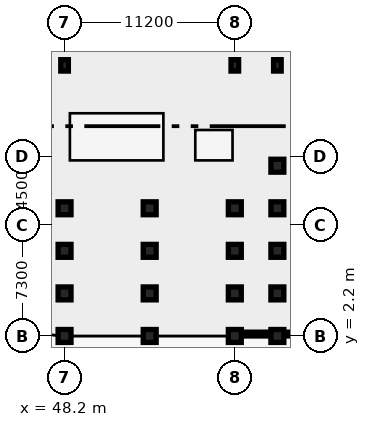
"""IFC4 building model, lengths in metres.
Left out: names, types, materials, properties, quantities, classifications, styles, units other than length and angle.
Written with IfcOpenShell. Run it as: python <this file> out.ifc"""

import sys

from ifc_helpers import new_model, si_unit, direction, frame, frame_2d, origin, origin_2d, place, context, subcontext, project, spatial, rectangle, extrude, element, fill, save


model = new_model("IFC4")
c1 = context("Model", 3, precision=1e-05, world=origin(), true_north=direction((0.0, 1.0)))
c2 = subcontext(c1, "Body", "Model", "MODEL_VIEW")
j1 = project(units=[si_unit("LENGTHUNIT", "METRE"), si_unit("PLANEANGLEUNIT", "RADIAN")], contexts=[c1])
p1 = place(None, origin())
s1 = spatial("IfcSite", under=j1, at=p1, CompositionType="ELEMENT")
p2 = place(p1, origin())
s2 = spatial("IfcBuilding", under=s1, at=p2, CompositionType="ELEMENT")
p3 = place(p2, origin())
s3 = spatial("IfcBuildingStorey", under=s2, at=p3, CompositionType="ELEMENT", Elevation=0.0)
p4 = place(p3, frame((48.08, 13.575, 0.0), z_axis=(0.0, 0.0, 1.0), x_axis=(1.0, 0.0, 0.0)))
e1 = element("IfcWall", 1, at=p4, inside=s3, PredefinedType="SHEAR", context=c2, shape_type="SweptSolid", body=[
    extrude(rectangle(XDim=8.545, YDim=0.35, at=frame_2d((4.272, 0.0))), origin(), (0.0, 0.0, 1.0), 4.15),
])
p5 = place(p3, frame((48.55, 17.025, 0.0), z_axis=(0.0, 0.0, 1.0), x_axis=(1.0, 0.0, 0.0)))
e2 = element("IfcWall", 2, at=p5, inside=s3, PredefinedType="SHEAR", context=c2, shape_type="SweptSolid", body=[
    extrude(rectangle(XDim=8.075, YDim=0.35, at=frame_2d((4.038, 0.0))), origin(), (0.0, 0.0, 1.0), 4.15),
])
p6 = place(p5, frame((6.38, 0.0, 0.0)))
e3 = element("IfcOpeningElement", 3, at=p6, cuts=e2, PredefinedType="OPENING", context=c2, shape_type="SweptSolid", body=[
    extrude(rectangle(XDim=1.24, YDim=2.15, at=frame_2d((0.62, 1.075))), frame((0.0, 0.185, 0.0), z_axis=(0.0, -1.0, 0.0), x_axis=(1.0, 0.0, 0.0)), (0.0, 0.0, 1.0), 0.37),
])
p7 = place(p3, frame((48.375, 17.35, 0.0), z_axis=(0.0, 0.0, 1.0), x_axis=(0.0, -1.0, 0.0)))
e4 = element("IfcWall", 4, at=p7, inside=s3, PredefinedType="SHEAR", context=c2, shape_type="SweptSolid", body=[
    extrude(rectangle(XDim=3.6, YDim=0.35, at=frame_2d((1.8, 0.0))), origin(), (0.0, 0.0, 1.0), 4.15),
])
p8 = place(p3, frame((56.65, 13.525, 0.0), z_axis=(0.0, 0.0, 1.0), x_axis=(1.0, 0.0, 0.0)))
e5 = element("IfcWall", 5, at=p8, inside=s3, PredefinedType="SHEAR", context=c2, shape_type="SweptSolid", body=[
    extrude(rectangle(XDim=2.8, YDim=0.25, at=frame_2d((1.4, 0.0))), origin(), (0.0, 0.0, 1.0), 4.15),
])
p9 = place(p3, frame((59.275, 15.85, 0.0), z_axis=(0.0, 0.0, 1.0), x_axis=(0.0, -1.0, 0.0)))
e6 = element("IfcWall", 6, at=p9, inside=s3, PredefinedType="SHEAR", context=c2, shape_type="SweptSolid", body=[
    extrude(rectangle(XDim=2.15, YDim=0.25, at=frame_2d((1.075, 0.0))), origin(), (0.0, 0.0, 1.0), 4.15),
])
p10 = place(p3, frame((48.2, 20.0, 0.0), z_axis=(0.0, 0.0, 1.0), x_axis=(1.0, 0.0, 0.0)))
e7 = element("IfcColumn", 7, at=p10, inside=s3, PredefinedType="COLUMN", context=c2, shape_type="SweptSolid", body=[
    extrude(rectangle(XDim=0.5, YDim=0.75, at=origin_2d()), origin(), (0.0, 0.0, 1.0), 4.15),
])
for number, where, z_axis, x_axis in (
    (8, (48.2, 10.6, 0.0), (0.0, 0.0, 1.0), (1.0, 0.0, 0.0)),
    (9, (48.2, 7.8, 0.0), (0.0, 0.0, 1.0), (1.0, 0.0, 0.0)),
    (10, (48.2, 5.0, 0.0), (0.0, 0.0, 1.0), (1.0, 0.0, 0.0)),
    (11, (48.2, 2.2, 0.0), (0.0, 0.0, 1.0), (1.0, 0.0, 0.0)),
    (12, (53.8, 10.6, 0.0), (0.0, 0.0, 1.0), (1.0, 0.0, 0.0)),
    (13, (53.8, 7.8, 0.0), (0.0, 0.0, 1.0), (1.0, 0.0, 0.0)),
    (14, (53.8, 5.0, 0.0), (0.0, 0.0, 1.0), (1.0, 0.0, 0.0)),
    (15, (53.8, 2.2, 0.0), (0.0, 0.0, 1.0), (1.0, 0.0, 0.0)),
):
    element("IfcColumn", number, at=place(p3, frame(where, z_axis=z_axis, x_axis=x_axis)), inside=s3, PredefinedType="COLUMN", context=c2, shape_type="SweptSolid", body=[
        extrude(rectangle(XDim=0.85, YDim=0.85, at=origin_2d()), origin(), (0.0, 0.0, 1.0), 4.15),
    ])
p11 = place(p3, frame((59.4, 20.0, 0.0), z_axis=(0.0, 0.0, 1.0), x_axis=(1.0, 0.0, 0.0)))
e16 = element("IfcColumn", 16, at=p11, inside=s3, PredefinedType="COLUMN", context=c2, shape_type="SweptSolid", body=[
    extrude(rectangle(XDim=0.5, YDim=0.75, at=origin_2d()), origin(), (0.0, 0.0, 1.0), 4.15),
])
for number, where, z_axis, x_axis in (
    (17, (59.4, 10.6, 0.0), (0.0, 0.0, 1.0), (1.0, 0.0, 0.0)),
    (18, (59.4, 7.8, 0.0), (0.0, 0.0, 1.0), (1.0, 0.0, 0.0)),
    (19, (59.4, 5.0, 0.0), (0.0, 0.0, 1.0), (1.0, 0.0, 0.0)),
    (20, (59.4, 2.2, 0.0), (0.0, 0.0, 1.0), (1.0, 0.0, 0.0)),
):
    element("IfcColumn", number, at=place(p3, frame(where, z_axis=z_axis, x_axis=x_axis)), inside=s3, PredefinedType="COLUMN", context=c2, shape_type="SweptSolid", body=[
        extrude(rectangle(XDim=0.85, YDim=0.85, at=origin_2d()), origin(), (0.0, 0.0, 1.0), 4.15),
    ])
p12 = place(p3, frame((62.2, 20.0, 0.0), z_axis=(0.0, 0.0, 1.0), x_axis=(1.0, 0.0, 0.0)))
e21 = element("IfcColumn", 21, at=p12, inside=s3, PredefinedType="COLUMN", context=c2, shape_type="SweptSolid", body=[
    extrude(rectangle(XDim=0.5, YDim=0.75, at=origin_2d()), origin(), (0.0, 0.0, 1.0), 4.15),
])
for number, where, z_axis, x_axis in (
    (22, (62.2, 13.4, 0.0), (0.0, 0.0, 1.0), (1.0, 0.0, 0.0)),
    (23, (62.2, 10.6, 0.0), (0.0, 0.0, 1.0), (1.0, 0.0, 0.0)),
    (24, (62.2, 7.8, 0.0), (0.0, 0.0, 1.0), (1.0, 0.0, 0.0)),
    (25, (62.2, 5.0, 0.0), (0.0, 0.0, 1.0), (1.0, 0.0, 0.0)),
    (26, (62.2, 2.2, 0.0), (0.0, 0.0, 1.0), (1.0, 0.0, 0.0)),
):
    element("IfcColumn", number, at=place(p3, frame(where, z_axis=z_axis, x_axis=x_axis)), inside=s3, PredefinedType="COLUMN", context=c2, shape_type="SweptSolid", body=[
        extrude(rectangle(XDim=0.85, YDim=0.85, at=origin_2d()), origin(), (0.0, 0.0, 1.0), 4.15),
    ])
p13 = place(p3, frame((53.7, 19.98, 0.0), z_axis=(0.0, 0.0, 1.0), x_axis=(1.0, 0.0, 0.0)))
e27 = element("IfcWall", 27, at=p13, inside=s3, PredefinedType="STANDARD", context=c2, shape_type="SweptSolid", body=[
    extrude(rectangle(XDim=5.65, YDim=0.2, at=frame_2d((2.825, 0.0))), origin(), (0.0, 0.0, 1.0), 3.492),
])
p14 = place(p13, frame((1.923, 0.0, 0.0)))
e28 = element("IfcOpeningElement", 28, at=p14, cuts=e27, PredefinedType="OPENING", context=c2, shape_type="SweptSolid", body=[
    extrude(rectangle(XDim=1.24, YDim=2.15, at=frame_2d((0.62, 1.075))), frame((0.0, 0.11, 0.0), z_axis=(0.0, -1.0, 0.0), x_axis=(1.0, 0.0, 0.0)), (0.0, 0.0, 1.0), 0.22),
])
p15 = place(p3, frame((48.45, 19.98, 0.0), z_axis=(0.0, 0.0, 1.0), x_axis=(1.0, 0.0, 0.0)))
e29 = element("IfcWall", 29, at=p15, inside=s3, PredefinedType="STANDARD", context=c2, shape_type="SweptSolid", body=[
    extrude(rectangle(XDim=5.25, YDim=0.2, at=frame_2d((2.625, 0.0))), origin(), (0.0, 0.0, 1.0), 3.492),
])
p16 = place(p15, frame((2.165, 0.0, 0.0)))
e30 = element("IfcOpeningElement", 30, at=p16, cuts=e29, PredefinedType="OPENING", context=c2, shape_type="SweptSolid", body=[
    extrude(rectangle(XDim=0.92, YDim=2.1, at=frame_2d((0.46, 1.05))), frame((0.0, 0.11, 0.0), z_axis=(0.0, -1.0, 0.0), x_axis=(1.0, 0.0, 0.0)), (0.0, 0.0, 1.0), 0.22),
])
p17 = place(p3, frame((53.7, 19.98, 0.0), z_axis=(0.0, 0.0, 1.0), x_axis=(0.0, -1.0, 0.0)))
e31 = element("IfcWall", 31, at=p17, inside=s3, PredefinedType="STANDARD", context=c2, shape_type="SweptSolid", body=[
    extrude(rectangle(XDim=2.93, YDim=0.2, at=frame_2d((1.465, 0.0))), origin(), (0.0, 0.0, 1.0), 3.492),
])
p18 = place(p3, frame((59.35, 19.98, 0.0), z_axis=(0.0, 0.0, 1.0), x_axis=(0.0, -1.0, 0.0)))
e32 = element("IfcWall", 32, at=p18, inside=s3, PredefinedType="STANDARD", context=c2, shape_type="SweptSolid", body=[
    extrude(rectangle(XDim=4.13, YDim=0.2, at=frame_2d((2.065, 0.0))), origin(), (0.0, 0.0, 1.0), 3.492),
])
p19 = place(p3, frame((56.7, 17.05, 0.0), z_axis=(0.0, 0.0, 1.0), x_axis=(0.0, -1.0, 0.0)))
e33 = element("IfcWall", 33, at=p19, inside=s3, PredefinedType="STANDARD", context=c2, shape_type="SweptSolid", body=[
    extrude(rectangle(XDim=3.3, YDim=0.2, at=frame_2d((1.65, 0.0))), origin(), (0.0, 0.0, 1.0), 4.15),
])
p20 = place(p3, frame((56.7, 15.85, 0.0), z_axis=(0.0, 0.0, 1.0), x_axis=(1.0, 0.0, 0.0)))
e34 = element("IfcWall", 34, at=p20, inside=s3, PredefinedType="STANDARD", context=c2, shape_type="SweptSolid", body=[
    extrude(rectangle(XDim=2.55, YDim=0.2, at=frame_2d((1.275, 0.0))), origin(), (0.0, 0.0, 1.0), 3.492),
])
p21 = place(p20, frame((0.725, 0.0, 0.0)))
e35 = element("IfcOpeningElement", 35, at=p21, cuts=e34, PredefinedType="OPENING", context=c2, shape_type="SweptSolid", body=[
    extrude(rectangle(XDim=1.1, YDim=2.15, at=frame_2d((0.55, 1.075))), frame((0.0, 0.11, 0.0), z_axis=(0.0, -1.0, 0.0), x_axis=(1.0, 0.0, 0.0)), (0.0, 0.0, 1.0), 0.22),
])
p22 = place(p3, frame((53.8, 13.3, 0.0), z_axis=(0.0, 0.0, 1.0), x_axis=(0.0, -1.0, 0.0)))
e36 = element("IfcWall", 36, at=p22, inside=s3, PredefinedType="PARTITIONING", context=c2, shape_type="SweptSolid", body=[
    extrude(rectangle(XDim=10.82, YDim=0.125, at=frame_2d((5.41, 0.0))), origin(), (0.0, 0.0, 1.0), 3.492),
])
p23 = place(p22, frame((0.899, 0.0, 0.0)))
e37 = element("IfcOpeningElement", 37, at=p23, cuts=e36, PredefinedType="OPENING", context=c2, shape_type="SweptSolid", body=[
    extrude(rectangle(XDim=0.8, YDim=2.1, at=frame_2d((0.4, 1.05))), frame((0.0, 0.073, 0.0), z_axis=(0.0, -1.0, 0.0), x_axis=(1.0, 0.0, 0.0)), (0.0, 0.0, 1.0), 0.145),
])
p24 = place(p3, frame((59.4, 20.0, 0.0), z_axis=(0.0, 0.0, 1.0), x_axis=(1.0, 0.0, 0.0)))
e38 = element("IfcWall", 38, at=p24, inside=s3, PredefinedType="STANDARD", context=c2, shape_type="SweptSolid", body=[
    extrude(rectangle(XDim=2.8, YDim=0.2, at=frame_2d((1.4, 0.0))), origin(), (0.0, 0.0, 1.0), 3.492),
])
p25 = place(p24, frame((0.9, 0.0, 0.0)))
e39 = element("IfcOpeningElement", 39, at=p25, cuts=e38, PredefinedType="OPENING", context=c2, shape_type="SweptSolid", body=[
    extrude(rectangle(XDim=1.0, YDim=2.15, at=frame_2d((0.5, 1.075))), frame((0.0, 0.11, 0.0), z_axis=(0.0, -1.0, 0.0), x_axis=(1.0, 0.0, 0.0)), (0.0, 0.0, 1.0), 0.22),
])
p26 = place(p3, frame((59.48, 7.8, 0.0), z_axis=(0.0, 0.0, 1.0), x_axis=(1.0, 0.0, 0.0)))
e40 = element("IfcWall", 40, at=p26, inside=s3, PredefinedType="PLUMBINGWALL", context=c2, shape_type="SweptSolid", body=[
    extrude(rectangle(XDim=2.64, YDim=0.16, at=frame_2d((1.32, 0.0))), origin(), (0.0, 0.0, 1.0), 3.492),
])
p27 = place(p26, frame((0.87, 0.0, 0.0)))
e41 = element("IfcOpeningElement", 41, at=p27, cuts=e40, PredefinedType="OPENING", context=c2, shape_type="SweptSolid", body=[
    extrude(rectangle(XDim=0.9, YDim=2.1, at=frame_2d((0.45, 1.05))), frame((0.0, 0.09, 0.0), z_axis=(0.0, -1.0, 0.0), x_axis=(1.0, 0.0, 0.0)), (0.0, 0.0, 1.0), 0.18),
])
p28 = place(p3, frame((62.2, 20.0, 0.0), z_axis=(0.0, 0.0, 1.0), x_axis=(1.0, 0.0, 0.0)))
e42 = element("IfcWall", 42, at=p28, inside=s3, PredefinedType="STANDARD", context=c2, shape_type="SweptSolid", body=[
    extrude(rectangle(XDim=2.8, YDim=0.2, at=frame_2d((1.4, 0.0))), origin(), (0.0, 0.0, 1.0), 3.492),
])
p29 = place(p3, frame((62.28, 7.8, 0.0), z_axis=(0.0, 0.0, 1.0), x_axis=(1.0, 0.0, 0.0)))
e43 = element("IfcWall", 43, at=p29, inside=s3, PredefinedType="PLUMBINGWALL", context=c2, shape_type="SweptSolid", body=[
    extrude(rectangle(XDim=2.64, YDim=0.16, at=frame_2d((1.32, 0.0))), origin(), (0.0, 0.0, 1.0), 3.492),
])
p30 = place(p29, frame((0.92, 0.0, 0.0)))
e44 = element("IfcOpeningElement", 44, at=p30, cuts=e43, PredefinedType="OPENING", context=c2, shape_type="SweptSolid", body=[
    extrude(rectangle(XDim=0.8, YDim=2.1, at=frame_2d((0.4, 1.05))), frame((0.0, 0.09, 0.0), z_axis=(0.0, -1.0, 0.0), x_axis=(1.0, 0.0, 0.0)), (0.0, 0.0, 1.0), 0.18),
])
p31 = place(p3, frame((59.4, 13.3, 0.0), z_axis=(0.0, 0.0, 1.0), x_axis=(0.0, -1.0, 0.0)))
e45 = element("IfcWall", 45, at=p31, inside=s3, PredefinedType="PARTITIONING", context=c2, shape_type="SweptSolid", body=[
    extrude(rectangle(XDim=10.82, YDim=0.15, at=frame_2d((5.41, 0.0))), origin(), (0.0, 0.0, 1.0), 3.492),
])
p32 = place(p31, frame((0.899, 0.0, 0.0)))
e46 = element("IfcOpeningElement", 46, at=p32, cuts=e45, PredefinedType="OPENING", context=c2, shape_type="SweptSolid", body=[
    extrude(rectangle(XDim=0.8, YDim=2.1, at=frame_2d((0.4, 1.05))), frame((0.0, 0.085, 0.0), z_axis=(0.0, -1.0, 0.0), x_axis=(1.0, 0.0, 0.0)), (0.0, 0.0, 1.0), 0.17),
])
p33 = place(p3, frame((62.2, 19.95, 0.0), z_axis=(0.0, 0.0, 1.0), x_axis=(0.0, -1.0, 0.0)))
e47 = element("IfcWall", 47, at=p33, inside=s3, PredefinedType="PARTITIONING", context=c2, shape_type="SweptSolid", body=[
    extrude(rectangle(XDim=6.53, YDim=0.15, at=frame_2d((3.265, 0.0))), origin(), (0.0, 0.0, 1.0), 3.492),
])
p34 = place(p33, frame((2.815, 0.0, 0.0)))
e48 = element("IfcOpeningElement", 48, at=p34, cuts=e47, PredefinedType="OPENING", context=c2, shape_type="SweptSolid", body=[
    extrude(rectangle(XDim=0.9, YDim=2.1, at=frame_2d((0.45, 1.05))), frame((0.0, 0.085, 0.0), z_axis=(0.0, -1.0, 0.0), x_axis=(1.0, 0.0, 0.0)), (0.0, 0.0, 1.0), 0.17),
])
p35 = place(p3, frame((62.2, 13.3, 0.0), z_axis=(0.0, 0.0, 1.0), x_axis=(0.0, -1.0, 0.0)))
e49 = element("IfcWall", 49, at=p35, inside=s3, PredefinedType="PARTITIONING", context=c2, shape_type="SweptSolid", body=[
    extrude(rectangle(XDim=10.82, YDim=0.15, at=frame_2d((5.41, 0.0))), origin(), (0.0, 0.0, 1.0), 3.492),
])
p36 = place(p35, frame((0.899, 0.0, 0.0)))
e50 = element("IfcOpeningElement", 50, at=p36, cuts=e49, PredefinedType="OPENING", context=c2, shape_type="SweptSolid", body=[
    extrude(rectangle(XDim=0.8, YDim=2.1, at=frame_2d((0.4, 1.05))), frame((0.0, 0.085, 0.0), z_axis=(0.0, -1.0, 0.0), x_axis=(1.0, 0.0, 0.0)), (0.0, 0.0, 1.0), 0.17),
])
p37 = place(p3, frame((48.2, 20.0, 0.0), z_axis=(0.0, 0.0, 1.0), x_axis=(-0.996193663584, 0.087167566415, 0.0)))
e51 = element("IfcWall", 51, at=p37, inside=s3, PredefinedType="STANDARD", context=c2, shape_type="SweptSolid", body=[
    extrude(rectangle(XDim=4.916, YDim=0.2, at=frame_2d((2.458, 0.0))), origin(), (0.0, 0.0, 1.0), 3.492),
])
p38 = place(p37, frame((1.918, 0.0, 0.0)))
e52 = element("IfcOpeningElement", 52, at=p38, cuts=e51, PredefinedType="OPENING", context=c2, shape_type="SweptSolid", body=[
    extrude(rectangle(XDim=1.08, YDim=2.15, at=frame_2d((0.54, 1.075))), frame((0.0, 0.11, 0.0), z_axis=(0.0, -1.0, 0.0), x_axis=(1.0, 0.0, 0.0)), (0.0, 0.0, 1.0), 0.22),
])
p39 = place(p3, frame((48.2, 13.3, 0.0), z_axis=(0.0, 0.0, 1.0), x_axis=(0.0, -1.0, 0.0)))
e53 = element("IfcWall", 53, at=p39, inside=s3, PredefinedType="PARTITIONING", context=c2, shape_type="SweptSolid", body=[
    extrude(rectangle(XDim=10.82, YDim=0.15, at=frame_2d((5.41, 0.0))), origin(), (0.0, 0.0, 1.0), 3.492),
])
p40 = place(p39, frame((0.899, 0.0, 0.0)))
e54 = element("IfcOpeningElement", 54, at=p40, cuts=e53, PredefinedType="OPENING", context=c2, shape_type="SweptSolid", body=[
    extrude(rectangle(XDim=0.8, YDim=2.1, at=frame_2d((0.4, 1.05))), frame((0.0, 0.085, 0.0), z_axis=(0.0, -1.0, 0.0), x_axis=(1.0, 0.0, 0.0)), (0.0, 0.0, 1.0), 0.17),
])
p41 = place(p3, frame((59.829, 2.325, 0.0), z_axis=(0.0, 0.0, 1.0), x_axis=(1.0, 0.0, 0.0)))
e55 = element("IfcWall", 55, at=p41, inside=s3, PredefinedType="STANDARD", context=c2, shape_type="SweptSolid", body=[
    extrude(rectangle(XDim=1.943, YDim=0.25, at=frame_2d((0.971, 0.0))), origin(), (0.0, 0.0, 1.0), 3.692),
])
p42 = place(p41, frame((0.497, 0.0, 0.88)))
e56 = element("IfcOpeningElement", 56, at=p42, cuts=e55, PredefinedType="OPENING", context=c2, shape_type="SweptSolid", body=[
    extrude(rectangle(XDim=0.95, YDim=1.35, at=frame_2d((0.475, 0.675))), frame((0.0, 0.135, 0.0), z_axis=(0.0, -1.0, 0.0), x_axis=(1.0, 0.0, 0.0)), (0.0, 0.0, 1.0), 0.27),
])
p43 = place(p3, frame((62.628, 2.325, 0.0), z_axis=(0.0, 0.0, 1.0), x_axis=(1.0, 0.0, 0.0)))
e57 = element("IfcWall", 57, at=p43, inside=s3, PredefinedType="STANDARD", context=c2, shape_type="SweptSolid", body=[
    extrude(rectangle(XDim=1.943, YDim=0.25, at=frame_2d((0.972, 0.0))), origin(), (0.0, 0.0, 1.0), 3.692),
])
p44 = place(p43, frame((0.372, 0.0, 0.88)))
e58 = element("IfcOpeningElement", 58, at=p44, cuts=e57, PredefinedType="OPENING", context=c2, shape_type="SweptSolid", body=[
    extrude(rectangle(XDim=1.2, YDim=1.5, at=frame_2d((0.6, 0.75))), frame((0.0, 0.135, 0.0), z_axis=(0.0, -1.0, 0.0), x_axis=(1.0, 0.0, 0.0)), (0.0, 0.0, 1.0), 0.27),
])
p45 = place(p42, origin())
e59 = element("IfcWindow", 59, at=p45, inside=s3, PartitioningType="SINGLE_PANEL", PredefinedType="WINDOW", context=c2, shape_type="SweptSolid", body=[
    extrude(rectangle(XDim=0.95, YDim=1.35, at=frame_2d((0.475, 0.675))), frame((0.0, 0.03, 0.0), z_axis=(0.0, -1.0, 0.0), x_axis=(1.0, 0.0, 0.0)), (0.0, 0.0, 1.0), 0.06),
])
fill(e56, e59)
p46 = place(p44, origin())
e60 = element("IfcWindow", 60, at=p46, inside=s3, PartitioningType="SINGLE_PANEL", PredefinedType="WINDOW", context=c2, shape_type="SweptSolid", body=[
    extrude(rectangle(XDim=1.2, YDim=1.5, at=frame_2d((0.6, 0.75))), frame((0.0, 0.03, 0.0), z_axis=(0.0, -1.0, 0.0), x_axis=(1.0, 0.0, 0.0)), (0.0, 0.0, 1.0), 0.06),
])
fill(e58, e60)
p47 = place(p14, frame((1.24, 0.0, 0.0), z_axis=(0.0, 0.0, 1.0), x_axis=(-1.0, 0.0, 0.0)))
e61 = element("IfcDoor", 61, at=p47, inside=s3, OperationType="SINGLE_SWING_RIGHT", PredefinedType="DOOR", context=c2, shape_type="SweptSolid", body=[
    extrude(rectangle(XDim=1.24, YDim=2.15, at=frame_2d((0.62, 1.075))), frame((0.0, 0.025, 0.0), z_axis=(0.0, -1.0, 0.0), x_axis=(1.0, 0.0, 0.0)), (0.0, 0.0, 1.0), 0.05),
])
fill(e28, e61)
p48 = place(p16, origin())
e62 = element("IfcDoor", 62, at=p48, inside=s3, OperationType="SINGLE_SWING_LEFT", PredefinedType="DOOR", context=c2, shape_type="SweptSolid", body=[
    extrude(rectangle(XDim=0.92, YDim=2.1, at=frame_2d((0.46, 1.05))), frame((0.0, 0.025, 0.0), z_axis=(0.0, -1.0, 0.0), x_axis=(1.0, 0.0, 0.0)), (0.0, 0.0, 1.0), 0.05),
])
fill(e30, e62)
p49 = place(p21, origin())
e63 = element("IfcDoor", 63, at=p49, inside=s3, OperationType="SLIDING_TO_LEFT", PredefinedType="DOOR", context=c2, shape_type="SweptSolid", body=[
    extrude(rectangle(XDim=1.1, YDim=2.15, at=frame_2d((0.55, 1.075))), frame((0.0, 0.025, 0.0), z_axis=(0.0, -1.0, 0.0), x_axis=(1.0, 0.0, 0.0)), (0.0, 0.0, 1.0), 0.05),
])
fill(e35, e63)
p50 = place(p6, origin())
e64 = element("IfcDoor", 64, at=p50, inside=s3, OperationType="SINGLE_SWING_LEFT", PredefinedType="DOOR", context=c2, shape_type="SweptSolid", body=[
    extrude(rectangle(XDim=1.24, YDim=2.15, at=frame_2d((0.62, 1.075))), frame((0.0, 0.025, 0.0), z_axis=(0.0, -1.0, 0.0), x_axis=(1.0, 0.0, 0.0)), (0.0, 0.0, 1.0), 0.05),
])
fill(e3, e64)
p51 = place(p23, origin())
e65 = element("IfcDoor", 65, at=p51, inside=s3, OperationType="SINGLE_SWING_LEFT", PredefinedType="DOOR", context=c2, shape_type="SweptSolid", body=[
    extrude(rectangle(XDim=0.8, YDim=2.1, at=frame_2d((0.4, 1.05))), frame((0.0, 0.025, 0.0), z_axis=(0.0, -1.0, 0.0), x_axis=(1.0, 0.0, 0.0)), (0.0, 0.0, 1.0), 0.05),
])
fill(e37, e65)
p52 = place(p27, origin())
e66 = element("IfcDoor", 66, at=p52, inside=s3, OperationType="SINGLE_SWING_LEFT", PredefinedType="DOOR", context=c2, shape_type="SweptSolid", body=[
    extrude(rectangle(XDim=0.9, YDim=2.1, at=frame_2d((0.45, 1.05))), frame((0.0, 0.025, 0.0), z_axis=(0.0, -1.0, 0.0), x_axis=(1.0, 0.0, 0.0)), (0.0, 0.0, 1.0), 0.05),
])
fill(e41, e66)
p53 = place(p25, frame((1.0, 0.0, 0.0), z_axis=(0.0, 0.0, 1.0), x_axis=(-1.0, 0.0, 0.0)))
e67 = element("IfcDoor", 67, at=p53, inside=s3, OperationType="SINGLE_SWING_RIGHT", PredefinedType="DOOR", context=c2, shape_type="SweptSolid", body=[
    extrude(rectangle(XDim=1.0, YDim=2.15, at=frame_2d((0.5, 1.075))), frame((0.0, 0.025, 0.0), z_axis=(0.0, -1.0, 0.0), x_axis=(1.0, 0.0, 0.0)), (0.0, 0.0, 1.0), 0.05),
])
fill(e39, e67)
p54 = place(p32, frame((0.8, 0.0, 0.0), z_axis=(0.0, 0.0, 1.0), x_axis=(-1.0, 0.0, 0.0)))
e68 = element("IfcDoor", 68, at=p54, inside=s3, OperationType="SINGLE_SWING_RIGHT", PredefinedType="DOOR", context=c2, shape_type="SweptSolid", body=[
    extrude(rectangle(XDim=0.8, YDim=2.1, at=frame_2d((0.4, 1.05))), frame((0.0, 0.025, 0.0), z_axis=(0.0, -1.0, 0.0), x_axis=(1.0, 0.0, 0.0)), (0.0, 0.0, 1.0), 0.05),
])
fill(e46, e68)
p55 = place(p34, frame((0.9, 0.0, 0.0), z_axis=(0.0, 0.0, 1.0), x_axis=(-1.0, 0.0, 0.0)))
e69 = element("IfcDoor", 69, at=p55, inside=s3, OperationType="SINGLE_SWING_RIGHT", PredefinedType="DOOR", context=c2, shape_type="SweptSolid", body=[
    extrude(rectangle(XDim=0.9, YDim=2.1, at=frame_2d((0.45, 1.05))), frame((0.0, 0.025, 0.0), z_axis=(0.0, -1.0, 0.0), x_axis=(1.0, 0.0, 0.0)), (0.0, 0.0, 1.0), 0.05),
])
fill(e48, e69)
p56 = place(p36, origin())
e70 = element("IfcDoor", 70, at=p56, inside=s3, OperationType="SINGLE_SWING_LEFT", PredefinedType="DOOR", context=c2, shape_type="SweptSolid", body=[
    extrude(rectangle(XDim=0.8, YDim=2.1, at=frame_2d((0.4, 1.05))), frame((0.0, 0.025, 0.0), z_axis=(0.0, -1.0, 0.0), x_axis=(1.0, 0.0, 0.0)), (0.0, 0.0, 1.0), 0.05),
])
fill(e50, e70)
p57 = place(p40, origin())
e71 = element("IfcDoor", 71, at=p57, inside=s3, OperationType="SINGLE_SWING_LEFT", PredefinedType="DOOR", context=c2, shape_type="SweptSolid", body=[
    extrude(rectangle(XDim=0.8, YDim=2.1, at=frame_2d((0.4, 1.05))), frame((0.0, 0.025, 0.0), z_axis=(0.0, -1.0, 0.0), x_axis=(1.0, 0.0, 0.0)), (0.0, 0.0, 1.0), 0.05),
])
fill(e54, e71)
save(model, sys.argv[1])
